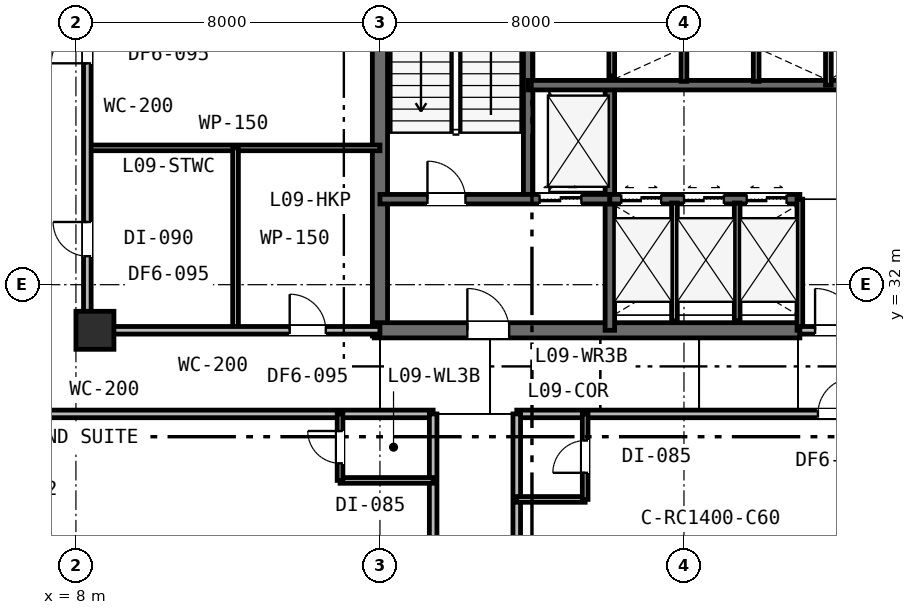
"""IFC4 building model, lengths in metres.
Left out: names, types, materials, properties, quantities, classifications, styles, units other than length and angle.
Written with IfcOpenShell. Run it as: python <this file> out.ifc"""

import sys

from ifc_helpers import new_model, si_unit, direction, frame, frame_2d, origin, origin_2d, place, context, subcontext, project, spatial, rectangle, extrude, element, fill, save


model = new_model("IFC4")
c1 = context("Model", 3, precision=1e-05, world=origin(), true_north=direction((0.0, 1.0)))
c2 = subcontext(c1, "Body", "Model", "MODEL_VIEW")
j1 = project(units=[si_unit("LENGTHUNIT", "METRE"), si_unit("PLANEANGLEUNIT", "RADIAN")], contexts=[c1])
p1 = place(None, origin())
s1 = spatial("IfcSite", under=j1, at=p1, CompositionType="ELEMENT")
p2 = place(p1, origin())
s2 = spatial("IfcBuilding", under=s1, at=p2, CompositionType="ELEMENT")
p3 = place(p2, frame((0.0, 0.0, 40.2)))
s3 = spatial("IfcBuildingStorey", under=s2, at=p3, CompositionType="ELEMENT", Elevation=40.2)
p4 = place(p3, frame((16.0, 30.65, 0.0), z_axis=(0.0, 0.0, 1.0), x_axis=(0.0, 1.0, 0.0)))
e1 = element("IfcWall", 1, at=p4, inside=s3, PredefinedType="SHEAR", context=c2, shape_type="SweptSolid", body=[
    extrude(rectangle(XDim=12.3, YDim=0.4, at=frame_2d((6.15, 0.0))), origin(), (0.0, 0.0, 1.0), 3.6),
])
p5 = place(p3, frame((15.85, 30.8, 0.0), z_axis=(0.0, 0.0, 1.0), x_axis=(1.0, 0.0, 0.0)))
e2 = element("IfcWall", 2, at=p5, inside=s3, PredefinedType="SHEAR", context=c2, shape_type="SweptSolid", body=[
    extrude(rectangle(XDim=11.2, YDim=0.4, at=frame_2d((5.6, 0.0))), origin(), (0.0, 0.0, 1.0), 3.6),
])
p6 = place(p5, frame((2.45, 0.0, 0.0)))
e3 = element("IfcOpeningElement", 3, at=p6, cuts=e2, PredefinedType="OPENING", context=c2, shape_type="SweptSolid", body=[
    extrude(rectangle(XDim=1.1, YDim=2.15, at=frame_2d((0.55, 1.075))), frame((0.0, 0.21, 0.0), z_axis=(0.0, -1.0, 0.0), x_axis=(1.0, 0.0, 0.0)), (0.0, 0.0, 1.0), 0.42),
])
p7 = place(p3, frame((19.9, 34.25, 0.0), z_axis=(0.0, 0.0, 1.0), x_axis=(0.0, 1.0, 0.0)))
e4 = element("IfcWall", 4, at=p7, inside=s3, PredefinedType="SHEAR", context=c2, shape_type="SweptSolid", body=[
    extrude(rectangle(XDim=8.65, YDim=0.25, at=frame_2d((4.325, 0.0))), origin(), (0.0, 0.0, 1.0), 3.6),
])
p8 = place(p3, frame((22.05, 30.8, 0.0), z_axis=(0.0, 0.0, 1.0), x_axis=(0.0, 1.0, 0.0)))
e5 = element("IfcWall", 5, at=p8, inside=s3, PredefinedType="SHEAR", context=c2, shape_type="SweptSolid", body=[
    extrude(rectangle(XDim=6.45, YDim=0.25, at=frame_2d((3.225, 0.0))), origin(), (0.0, 0.0, 1.0), 3.6),
])
p9 = place(p3, frame((16.0, 34.25, 0.0), z_axis=(0.0, 0.0, 1.0), x_axis=(1.0, 0.0, 0.0)))
e6 = element("IfcWall", 6, at=p9, inside=s3, PredefinedType="SHEAR", context=c2, shape_type="SweptSolid", body=[
    extrude(rectangle(XDim=6.05, YDim=0.25, at=frame_2d((3.025, 0.0))), origin(), (0.0, 0.0, 1.0), 3.6),
])
p10 = place(p9, frame((1.25, 0.0, 0.0)))
e7 = element("IfcOpeningElement", 7, at=p10, cuts=e6, PredefinedType="OPENING", context=c2, shape_type="SweptSolid", body=[
    extrude(rectangle(XDim=1.0, YDim=2.15, at=frame_2d((0.5, 1.075))), frame((0.0, 0.135, 0.0), z_axis=(0.0, -1.0, 0.0), x_axis=(1.0, 0.0, 0.0)), (0.0, 0.0, 1.0), 0.27),
])
p11 = place(p9, frame((4.2, 0.0, 0.0)))
e8 = element("IfcOpeningElement", 8, at=p11, cuts=e6, PredefinedType="OPENING", context=c2, shape_type="SweptSolid", body=[
    extrude(rectangle(XDim=1.1, YDim=2.15, at=frame_2d((0.55, 1.075))), frame((0.0, 0.135, 0.0), z_axis=(0.0, -1.0, 0.0), x_axis=(1.0, 0.0, 0.0)), (0.0, 0.0, 1.0), 0.27),
])
p12 = place(p3, frame((22.05, 34.25, 0.0), z_axis=(0.0, 0.0, 1.0), x_axis=(1.0, 0.0, 0.0)))
e9 = element("IfcWall", 9, at=p12, inside=s3, PredefinedType="SHEAR", context=c2, shape_type="SweptSolid", body=[
    extrude(rectangle(XDim=5.0, YDim=0.25, at=frame_2d((2.5, 0.0))), origin(), (0.0, 0.0, 1.0), 3.6),
])
p13 = place(p12, frame((0.3, 0.0, 0.0)))
e10 = element("IfcOpeningElement", 10, at=p13, cuts=e9, PredefinedType="OPENING", context=c2, shape_type="SweptSolid", body=[
    extrude(rectangle(XDim=1.05, YDim=2.15, at=frame_2d((0.525, 1.075))), frame((0.0, 0.135, 0.0), z_axis=(0.0, -1.0, 0.0), x_axis=(1.0, 0.0, 0.0)), (0.0, 0.0, 1.0), 0.27),
])
p14 = place(p12, frame((1.95, 0.0, 0.0)))
e11 = element("IfcOpeningElement", 11, at=p14, cuts=e9, PredefinedType="OPENING", context=c2, shape_type="SweptSolid", body=[
    extrude(rectangle(XDim=1.05, YDim=2.15, at=frame_2d((0.525, 1.075))), frame((0.0, 0.135, 0.0), z_axis=(0.0, -1.0, 0.0), x_axis=(1.0, 0.0, 0.0)), (0.0, 0.0, 1.0), 0.27),
])
p15 = place(p12, frame((3.6, 0.0, 0.0)))
e12 = element("IfcOpeningElement", 12, at=p15, cuts=e9, PredefinedType="OPENING", context=c2, shape_type="SweptSolid", body=[
    extrude(rectangle(XDim=1.05, YDim=2.15, at=frame_2d((0.525, 1.075))), frame((0.0, 0.135, 0.0), z_axis=(0.0, -1.0, 0.0), x_axis=(1.0, 0.0, 0.0)), (0.0, 0.0, 1.0), 0.27),
])
p16 = place(p3, frame((19.9, 37.25, 0.0), z_axis=(0.0, 0.0, 1.0), x_axis=(1.0, 0.0, 0.0)))
e13 = element("IfcWall", 13, at=p16, inside=s3, PredefinedType="SHEAR", context=c2, shape_type="SweptSolid", body=[
    extrude(rectangle(XDim=16.2, YDim=0.25, at=frame_2d((8.1, 0.0))), origin(), (0.0, 0.0, 1.0), 3.6),
])
p17 = place(p16, frame((12.55, 0.0, 0.0)))
e14 = element("IfcOpeningElement", 14, at=p17, cuts=e13, PredefinedType="OPENING", context=c2, shape_type="SweptSolid", body=[
    extrude(rectangle(XDim=0.9, YDim=2.15, at=frame_2d((0.45, 1.075))), frame((0.0, 0.135, 0.0), z_axis=(0.0, -1.0, 0.0), x_axis=(1.0, 0.0, 0.0)), (0.0, 0.0, 1.0), 0.27),
])
p18 = place(p3, frame((8.5, 30.8, 0.0), z_axis=(0.0, 0.0, 1.0), x_axis=(1.0, 0.0, 0.0)))
e15 = element("IfcColumn", 15, at=p18, inside=s3, PredefinedType="COLUMN", context=c2, shape_type="SweptSolid", body=[
    extrude(rectangle(XDim=1.0, YDim=1.0, at=origin_2d()), origin(), (0.0, 0.0, 1.0), 3.6),
])
p19 = place(p3, frame((27.05, 30.8, 0.0), z_axis=(0.0, 0.0, 1.0), x_axis=(0.0, 1.0, 0.0)))
e16 = element("IfcWall", 16, at=p19, inside=s3, PredefinedType="PLUMBINGWALL", context=c2, shape_type="SweptSolid", body=[
    extrude(rectangle(XDim=3.45, YDim=0.15, at=frame_2d((1.725, 0.0))), origin(), (0.0, 0.0, 1.0), 3.33),
])
p20 = place(p3, frame((27.05, 30.8, 0.0), z_axis=(0.0, 0.0, 1.0), x_axis=(1.0, 0.0, 0.0)))
e17 = element("IfcWall", 17, at=p20, inside=s3, PredefinedType="PARTITIONING", context=c2, shape_type="SweptSolid", body=[
    extrude(rectangle(XDim=1.9, YDim=0.2, at=frame_2d((0.95, 0.0))), origin(), (0.0, 0.0, 1.0), 3.33),
])
p21 = place(p20, frame((0.4, 0.0, 0.0)))
e18 = element("IfcOpeningElement", 18, at=p21, cuts=e17, PredefinedType="OPENING", context=c2, shape_type="SweptSolid", body=[
    extrude(rectangle(XDim=1.1, YDim=2.15, at=frame_2d((0.55, 1.075))), frame((0.0, 0.11, 0.0), z_axis=(0.0, -1.0, 0.0), x_axis=(1.0, 0.0, 0.0)), (0.0, 0.0, 1.0), 0.22),
])
for number, where, z_axis, x_axis in (
    (19, (23.75, 31.05, 0.0), (0.0, 0.0, 1.0), (0.0, 1.0, 0.0)),
    (20, (25.4, 31.05, 0.0), (0.0, 0.0, 1.0), (0.0, 1.0, 0.0)),
):
    element("IfcWall", number, at=place(p3, frame(where, z_axis=z_axis, x_axis=x_axis)), inside=s3, PredefinedType="PLUMBINGWALL", context=c2, shape_type="SweptSolid", body=[
        extrude(rectangle(XDim=3.1, YDim=0.15, at=frame_2d((1.55, 0.0))), origin(), (0.0, 0.0, 1.0), 3.33),
    ])
p22 = place(p3, frame((22.1, 37.49, 0.0), z_axis=(0.0, 0.0, 1.0), x_axis=(0.0, 1.0, 0.0)))
e21 = element("IfcWall", 21, at=p22, inside=s3, PredefinedType="PLUMBINGWALL", context=c2, shape_type="SweptSolid", body=[
    extrude(rectangle(XDim=2.56, YDim=0.15, at=frame_2d((1.28, 0.0))), origin(), (0.0, 0.0, 1.0), 3.33),
])
p23 = place(p3, frame((27.8, 37.25, 0.0), z_axis=(0.0, 0.0, 1.0), x_axis=(0.0, 1.0, 0.0)))
e22 = element("IfcWall", 22, at=p23, inside=s3, PredefinedType="PLUMBINGWALL", context=c2, shape_type="SweptSolid", body=[
    extrude(rectangle(XDim=2.8, YDim=0.15, at=frame_2d((1.4, 0.0))), origin(), (0.0, 0.0, 1.0), 3.33),
])
for number, where, z_axis, x_axis in (
    (23, (24.0, 37.35, 0.0), (0.0, 0.0, 1.0), (0.0, 1.0, 0.0)),
    (24, (25.9, 37.35, 0.0), (0.0, 0.0, 1.0), (0.0, 1.0, 0.0)),
):
    element("IfcWall", number, at=place(p3, frame(where, z_axis=z_axis, x_axis=x_axis)), inside=s3, PredefinedType="PLUMBINGWALL", context=c2, shape_type="SweptSolid", body=[
        extrude(rectangle(XDim=2.6, YDim=0.15, at=frame_2d((1.3, 0.0))), origin(), (0.0, 0.0, 1.0), 3.33),
    ])
p24 = place(p3, frame((0.1, 28.6, 0.0), z_axis=(0.0, 0.0, 1.0), x_axis=(1.0, 0.0, 0.0)))
e25 = element("IfcWall", 25, at=p24, inside=s3, PredefinedType="PARTITIONING", context=c2, shape_type="SweptSolid", body=[
    extrude(rectangle(XDim=17.3, YDim=0.2, at=frame_2d((8.65, 0.0))), origin(), (0.0, 0.0, 1.0), 2.82),
])
p25 = place(p3, frame((19.6, 28.6, 0.0), z_axis=(0.0, 0.0, 1.0), x_axis=(1.0, 0.0, 0.0)))
e26 = element("IfcWall", 26, at=p25, inside=s3, PredefinedType="PARTITIONING", context=c2, shape_type="SweptSolid", body=[
    extrude(rectangle(XDim=30.8, YDim=0.2, at=frame_2d((15.4, 0.0))), origin(), (0.0, 0.0, 1.0), 2.82),
])
p26 = place(p25, frame((7.925, 0.0, 0.0)))
e27 = element("IfcOpeningElement", 27, at=p26, cuts=e26, PredefinedType="OPENING", context=c2, shape_type="SweptSolid", body=[
    extrude(rectangle(XDim=0.95, YDim=2.15, at=frame_2d((0.475, 1.075))), frame((0.0, 0.11, 0.0), z_axis=(0.0, -1.0, 0.0), x_axis=(1.0, 0.0, 0.0)), (0.0, 0.0, 1.0), 0.22),
])
p27 = place(p25, frame((16.39, 0.0, 0.0)))
e28 = element("IfcOpeningElement", 28, at=p27, cuts=e26, PredefinedType="OPENING", context=c2, shape_type="SweptSolid", body=[
    extrude(rectangle(XDim=0.95, YDim=2.15, at=frame_2d((0.475, 1.075))), frame((0.0, 0.11, 0.0), z_axis=(0.0, -1.0, 0.0), x_axis=(1.0, 0.0, 0.0)), (0.0, 0.0, 1.0), 0.22),
])
p28 = place(p25, frame((26.835, 0.0, 0.0)))
e29 = element("IfcOpeningElement", 29, at=p28, cuts=e26, PredefinedType="OPENING", context=c2, shape_type="SweptSolid", body=[
    extrude(rectangle(XDim=0.95, YDim=2.15, at=frame_2d((0.475, 1.075))), frame((0.0, 0.11, 0.0), z_axis=(0.0, -1.0, 0.0), x_axis=(1.0, 0.0, 0.0)), (0.0, 0.0, 1.0), 0.22),
])
p29 = place(p3, frame((8.3, 35.6, 0.0), z_axis=(0.0, 0.0, 1.0), x_axis=(1.0, 0.0, 0.0)))
e30 = element("IfcWall", 30, at=p29, inside=s3, PredefinedType="PARTITIONING", context=c2, shape_type="SweptSolid", body=[
    extrude(rectangle(XDim=7.7, YDim=0.15, at=frame_2d((3.85, 0.0))), origin(), (0.0, 0.0, 1.0), 2.82),
])
p30 = place(p3, frame((12.2, 30.8, 0.0), z_axis=(0.0, 0.0, 1.0), x_axis=(0.0, 1.0, 0.0)))
e31 = element("IfcWall", 31, at=p30, inside=s3, PredefinedType="PARTITIONING", context=c2, shape_type="SweptSolid", body=[
    extrude(rectangle(XDim=4.8, YDim=0.15, at=frame_2d((2.4, 0.0))), origin(), (0.0, 0.0, 1.0), 2.82),
])
p31 = place(p3, frame((8.3, 30.8, 0.0), z_axis=(0.0, 0.0, 1.0), x_axis=(1.0, 0.0, 0.0)))
e32 = element("IfcWall", 32, at=p31, inside=s3, PredefinedType="PARTITIONING", context=c2, shape_type="SweptSolid", body=[
    extrude(rectangle(XDim=7.7, YDim=0.2, at=frame_2d((3.85, 0.0))), origin(), (0.0, 0.0, 1.0), 2.82),
])
p32 = place(p31, frame((5.325, 0.0, 0.0)))
e33 = element("IfcOpeningElement", 33, at=p32, cuts=e32, PredefinedType="OPENING", context=c2, shape_type="SweptSolid", body=[
    extrude(rectangle(XDim=0.95, YDim=2.15, at=frame_2d((0.475, 1.075))), frame((0.0, 0.11, 0.0), z_axis=(0.0, -1.0, 0.0), x_axis=(1.0, 0.0, 0.0)), (0.0, 0.0, 1.0), 0.22),
])
p33 = place(p3, frame((8.3, 30.8, 0.0), z_axis=(0.0, 0.0, 1.0), x_axis=(0.0, 1.0, 0.0)))
e34 = element("IfcWall", 34, at=p33, inside=s3, PredefinedType="PARTITIONING", context=c2, shape_type="SweptSolid", body=[
    extrude(rectangle(XDim=10.2, YDim=0.2, at=frame_2d((5.1, 0.0))), origin(), (0.0, 0.0, 1.0), 2.82),
])
p34 = place(p33, frame((1.95, 0.0, 0.0)))
e35 = element("IfcOpeningElement", 35, at=p34, cuts=e34, PredefinedType="OPENING", context=c2, shape_type="SweptSolid", body=[
    extrude(rectangle(XDim=0.9, YDim=2.15, at=frame_2d((0.45, 1.075))), frame((0.0, 0.11, 0.0), z_axis=(0.0, -1.0, 0.0), x_axis=(1.0, 0.0, 0.0)), (0.0, 0.0, 1.0), 0.22),
])
p35 = place(p33, frame((7.025, 0.0, 0.0)))
e36 = element("IfcOpeningElement", 36, at=p35, cuts=e34, PredefinedType="OPENING", context=c2, shape_type="SweptSolid", body=[
    extrude(rectangle(XDim=0.95, YDim=2.15, at=frame_2d((0.475, 1.075))), frame((0.0, 0.11, 0.0), z_axis=(0.0, -1.0, 0.0), x_axis=(1.0, 0.0, 0.0)), (0.0, 0.0, 1.0), 0.22),
])
p36 = place(p3, frame((17.4, 5.6, 0.0), z_axis=(0.0, 0.0, 1.0), x_axis=(0.0, 1.0, 0.0)))
e37 = element("IfcWall", 37, at=p36, inside=s3, PredefinedType="PARTITIONING", context=c2, shape_type="SweptSolid", body=[
    extrude(rectangle(XDim=23.0, YDim=0.2, at=frame_2d((11.5, 0.0))), origin(), (0.0, 0.0, 1.0), 2.82),
])
p37 = place(p36, frame((0.84, 0.0, 0.0)))
e38 = element("IfcOpeningElement", 38, at=p37, cuts=e37, PredefinedType="OPENING", context=c2, shape_type="SweptSolid", body=[
    extrude(rectangle(XDim=0.95, YDim=2.15, at=frame_2d((0.475, 1.075))), frame((0.0, 0.11, 0.0), z_axis=(0.0, -1.0, 0.0), x_axis=(1.0, 0.0, 0.0)), (0.0, 0.0, 1.0), 0.22),
])
p38 = place(p36, frame((8.983, 0.0, 0.0)))
e39 = element("IfcOpeningElement", 39, at=p38, cuts=e37, PredefinedType="OPENING", context=c2, shape_type="SweptSolid", body=[
    extrude(rectangle(XDim=0.95, YDim=2.15, at=frame_2d((0.475, 1.075))), frame((0.0, 0.11, 0.0), z_axis=(0.0, -1.0, 0.0), x_axis=(1.0, 0.0, 0.0)), (0.0, 0.0, 1.0), 0.22),
])
p39 = place(p36, frame((16.476, 0.0, 0.0)))
e40 = element("IfcOpeningElement", 40, at=p39, cuts=e37, PredefinedType="OPENING", context=c2, shape_type="SweptSolid", body=[
    extrude(rectangle(XDim=0.95, YDim=2.15, at=frame_2d((0.475, 1.075))), frame((0.0, 0.11, 0.0), z_axis=(0.0, -1.0, 0.0), x_axis=(1.0, 0.0, 0.0)), (0.0, 0.0, 1.0), 0.22),
])
p40 = place(p3, frame((19.6, 5.6, 0.0), z_axis=(0.0, 0.0, 1.0), x_axis=(0.0, 1.0, 0.0)))
e41 = element("IfcWall", 41, at=p40, inside=s3, PredefinedType="PARTITIONING", context=c2, shape_type="SweptSolid", body=[
    extrude(rectangle(XDim=23.0, YDim=0.2, at=frame_2d((11.5, 0.0))), origin(), (0.0, 0.0, 1.0), 2.82),
])
p41 = place(p40, frame((2.1, 0.0, 0.0)))
e42 = element("IfcOpeningElement", 42, at=p41, cuts=e41, PredefinedType="OPENING", context=c2, shape_type="SweptSolid", body=[
    extrude(rectangle(XDim=0.95, YDim=2.15, at=frame_2d((0.475, 1.075))), frame((0.0, 0.11, 0.0), z_axis=(0.0, -1.0, 0.0), x_axis=(1.0, 0.0, 0.0)), (0.0, 0.0, 1.0), 0.22),
])
p42 = place(p40, frame((9.81, 0.0, 0.0)))
e43 = element("IfcOpeningElement", 43, at=p42, cuts=e41, PredefinedType="OPENING", context=c2, shape_type="SweptSolid", body=[
    extrude(rectangle(XDim=0.95, YDim=2.15, at=frame_2d((0.475, 1.075))), frame((0.0, 0.11, 0.0), z_axis=(0.0, -1.0, 0.0), x_axis=(1.0, 0.0, 0.0)), (0.0, 0.0, 1.0), 0.22),
])
p43 = place(p40, frame((17.41, 0.0, 0.0)))
e44 = element("IfcOpeningElement", 44, at=p43, cuts=e41, PredefinedType="OPENING", context=c2, shape_type="SweptSolid", body=[
    extrude(rectangle(XDim=0.95, YDim=2.15, at=frame_2d((0.475, 1.075))), frame((0.0, 0.11, 0.0), z_axis=(0.0, -1.0, 0.0), x_axis=(1.0, 0.0, 0.0)), (0.0, 0.0, 1.0), 0.22),
])
p44 = place(p3, frame((14.95, 26.85, 0.0), z_axis=(0.0, 0.0, 1.0), x_axis=(1.0, 0.0, 0.0)))
e45 = element("IfcWall", 45, at=p44, inside=s3, PredefinedType="PARTITIONING", context=c2, shape_type="SweptSolid", body=[
    extrude(rectangle(XDim=2.45, YDim=0.15, at=frame_2d((1.225, 0.0))), origin(), (0.0, 0.0, 1.0), 2.82),
])
p45 = place(p3, frame((14.95, 26.85, 0.0), z_axis=(0.0, 0.0, 1.0), x_axis=(0.0, 1.0, 0.0)))
e46 = element("IfcWall", 46, at=p45, inside=s3, PredefinedType="PARTITIONING", context=c2, shape_type="SweptSolid", body=[
    extrude(rectangle(XDim=1.75, YDim=0.15, at=frame_2d((0.875, 0.0))), origin(), (0.0, 0.0, 1.0), 3.33),
])
p46 = place(p45, frame((0.45, 0.0, 0.0)))
e47 = element("IfcOpeningElement", 47, at=p46, cuts=e46, PredefinedType="OPENING", context=c2, shape_type="SweptSolid", body=[
    extrude(rectangle(XDim=0.85, YDim=2.15, at=frame_2d((0.425, 1.075))), frame((0.0, 0.085, 0.0), z_axis=(0.0, -1.0, 0.0), x_axis=(1.0, 0.0, 0.0)), (0.0, 0.0, 1.0), 0.17),
])
p47 = place(p3, frame((19.6, 26.35, 0.0), z_axis=(0.0, 0.0, 1.0), x_axis=(1.0, 0.0, 0.0)))
e48 = element("IfcWall", 48, at=p47, inside=s3, PredefinedType="PARTITIONING", context=c2, shape_type="SweptSolid", body=[
    extrude(rectangle(XDim=1.8, YDim=0.15, at=frame_2d((0.9, 0.0))), origin(), (0.0, 0.0, 1.0), 2.96),
])
p48 = place(p3, frame((21.4, 26.35, 0.0), z_axis=(0.0, 0.0, 1.0), x_axis=(0.0, 1.0, 0.0)))
e49 = element("IfcWall", 49, at=p48, inside=s3, PredefinedType="PARTITIONING", context=c2, shape_type="SweptSolid", body=[
    extrude(rectangle(XDim=2.25, YDim=0.15, at=frame_2d((1.125, 0.0))), origin(), (0.0, 0.0, 1.0), 2.96),
])
p49 = place(p48, frame((0.7, 0.0, 0.0)))
e50 = element("IfcOpeningElement", 50, at=p49, cuts=e49, PredefinedType="OPENING", context=c2, shape_type="SweptSolid", body=[
    extrude(rectangle(XDim=0.85, YDim=2.15, at=frame_2d((0.425, 1.075))), frame((0.0, 0.085, 0.0), z_axis=(0.0, -1.0, 0.0), x_axis=(1.0, 0.0, 0.0)), (0.0, 0.0, 1.0), 0.17),
])
p50 = place(p21, origin())
e51 = element("IfcDoor", 51, at=p50, inside=s3, OperationType="SINGLE_SWING_LEFT", PredefinedType="DOOR", context=c2, shape_type="SweptSolid", body=[
    extrude(rectangle(XDim=1.1, YDim=2.15, at=frame_2d((0.55, 1.075))), frame((0.0, 0.025, 0.0), z_axis=(0.0, -1.0, 0.0), x_axis=(1.0, 0.0, 0.0)), (0.0, 0.0, 1.0), 0.05),
])
fill(e18, e51)
p51 = place(p10, origin())
e52 = element("IfcDoor", 52, at=p51, inside=s3, OperationType="SINGLE_SWING_LEFT", PredefinedType="DOOR", context=c2, shape_type="SweptSolid", body=[
    extrude(rectangle(XDim=1.0, YDim=2.15, at=frame_2d((0.5, 1.075))), frame((0.0, 0.025, 0.0), z_axis=(0.0, -1.0, 0.0), x_axis=(1.0, 0.0, 0.0)), (0.0, 0.0, 1.0), 0.05),
])
fill(e7, e52)
p52 = place(p6, origin())
e53 = element("IfcDoor", 53, at=p52, inside=s3, OperationType="SINGLE_SWING_LEFT", PredefinedType="DOOR", context=c2, shape_type="SweptSolid", body=[
    extrude(rectangle(XDim=1.1, YDim=2.15, at=frame_2d((0.55, 1.075))), frame((0.0, 0.025, 0.0), z_axis=(0.0, -1.0, 0.0), x_axis=(1.0, 0.0, 0.0)), (0.0, 0.0, 1.0), 0.05),
])
fill(e3, e53)
p53 = place(p32, origin())
e54 = element("IfcDoor", 54, at=p53, inside=s3, OperationType="SINGLE_SWING_LEFT", PredefinedType="DOOR", context=c2, shape_type="SweptSolid", body=[
    extrude(rectangle(XDim=0.95, YDim=2.15, at=frame_2d((0.475, 1.075))), frame((0.0, 0.025, 0.0), z_axis=(0.0, -1.0, 0.0), x_axis=(1.0, 0.0, 0.0)), (0.0, 0.0, 1.0), 0.05),
])
fill(e33, e54)
p54 = place(p34, origin())
e55 = element("IfcDoor", 55, at=p54, inside=s3, OperationType="SINGLE_SWING_RIGHT", PredefinedType="DOOR", context=c2, shape_type="SweptSolid", body=[
    extrude(rectangle(XDim=0.9, YDim=2.15, at=frame_2d((0.45, 1.075))), frame((0.0, 0.025, 0.0), z_axis=(0.0, -1.0, 0.0), x_axis=(1.0, 0.0, 0.0)), (0.0, 0.0, 1.0), 0.05),
])
fill(e35, e55)
p55 = place(p35, origin())
e56 = element("IfcDoor", 56, at=p55, inside=s3, OperationType="SINGLE_SWING_LEFT", PredefinedType="DOOR", context=c2, shape_type="SweptSolid", body=[
    extrude(rectangle(XDim=0.95, YDim=2.15, at=frame_2d((0.475, 1.075))), frame((0.0, 0.025, 0.0), z_axis=(0.0, -1.0, 0.0), x_axis=(1.0, 0.0, 0.0)), (0.0, 0.0, 1.0), 0.05),
])
fill(e36, e56)
p56 = place(p26, origin())
e57 = element("IfcDoor", 57, at=p56, inside=s3, OperationType="SINGLE_SWING_RIGHT", PredefinedType="DOOR", context=c2, shape_type="SweptSolid", body=[
    extrude(rectangle(XDim=0.95, YDim=2.15, at=frame_2d((0.475, 1.075))), frame((0.0, 0.025, 0.0), z_axis=(0.0, -1.0, 0.0), x_axis=(1.0, 0.0, 0.0)), (0.0, 0.0, 1.0), 0.05),
])
fill(e27, e57)
p57 = place(p46, origin())
e58 = element("IfcDoor", 58, at=p57, inside=s3, OperationType="SINGLE_SWING_RIGHT", PredefinedType="DOOR", context=c2, shape_type="SweptSolid", body=[
    extrude(rectangle(XDim=0.85, YDim=2.15, at=frame_2d((0.425, 1.075))), frame((0.0, 0.025, 0.0), z_axis=(0.0, -1.0, 0.0), x_axis=(1.0, 0.0, 0.0)), (0.0, 0.0, 1.0), 0.05),
])
fill(e47, e58)
p58 = place(p49, origin())
e59 = element("IfcDoor", 59, at=p58, inside=s3, OperationType="SINGLE_SWING_LEFT", PredefinedType="DOOR", context=c2, shape_type="SweptSolid", body=[
    extrude(rectangle(XDim=0.85, YDim=2.15, at=frame_2d((0.425, 1.075))), frame((0.0, 0.025, 0.0), z_axis=(0.0, -1.0, 0.0), x_axis=(1.0, 0.0, 0.0)), (0.0, 0.0, 1.0), 0.05),
])
fill(e50, e59)
p59 = place(p11, origin())
e60 = element("IfcDoor", 60, at=p59, inside=s3, OperationType="DOUBLE_DOOR_SLIDING", PredefinedType="DOOR", context=c2, shape_type="SweptSolid", body=[
    extrude(rectangle(XDim=1.1, YDim=2.15, at=frame_2d((0.55, 1.075))), frame((0.0, 0.025, 0.0), z_axis=(0.0, -1.0, 0.0), x_axis=(1.0, 0.0, 0.0)), (0.0, 0.0, 1.0), 0.05),
])
fill(e8, e60)
p60 = place(p13, origin())
e61 = element("IfcDoor", 61, at=p60, inside=s3, OperationType="DOUBLE_DOOR_SLIDING", PredefinedType="DOOR", context=c2, shape_type="SweptSolid", body=[
    extrude(rectangle(XDim=1.05, YDim=2.15, at=frame_2d((0.525, 1.075))), frame((0.0, 0.025, 0.0), z_axis=(0.0, -1.0, 0.0), x_axis=(1.0, 0.0, 0.0)), (0.0, 0.0, 1.0), 0.05),
])
fill(e10, e61)
p61 = place(p14, origin())
e62 = element("IfcDoor", 62, at=p61, inside=s3, OperationType="DOUBLE_DOOR_SLIDING", PredefinedType="DOOR", context=c2, shape_type="SweptSolid", body=[
    extrude(rectangle(XDim=1.05, YDim=2.15, at=frame_2d((0.525, 1.075))), frame((0.0, 0.025, 0.0), z_axis=(0.0, -1.0, 0.0), x_axis=(1.0, 0.0, 0.0)), (0.0, 0.0, 1.0), 0.05),
])
fill(e11, e62)
p62 = place(p15, origin())
e63 = element("IfcDoor", 63, at=p62, inside=s3, OperationType="DOUBLE_DOOR_SLIDING", PredefinedType="DOOR", context=c2, shape_type="SweptSolid", body=[
    extrude(rectangle(XDim=1.05, YDim=2.15, at=frame_2d((0.525, 1.075))), frame((0.0, 0.025, 0.0), z_axis=(0.0, -1.0, 0.0), x_axis=(1.0, 0.0, 0.0)), (0.0, 0.0, 1.0), 0.05),
])
fill(e12, e63)
save(model, sys.argv[1])
